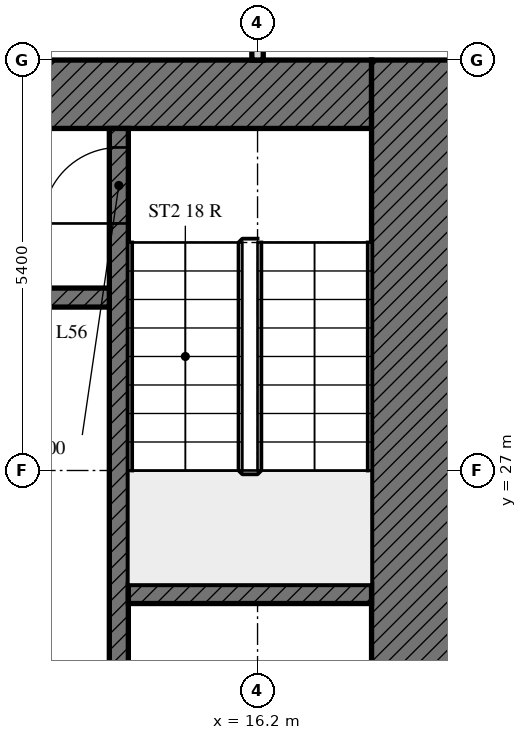
"""IFC4 building model, lengths in metres.
Left out: names, types, materials, properties, quantities, classifications, styles, units other than length and angle.
Written with IfcOpenShell. Run it as: python <this file> out.ifc"""

import sys

from ifc_helpers import new_model, si_unit, direction, frame, frame_2d, origin, place, context, subcontext, project, spatial, rectangle, extrude, element, fill, save


model = new_model("IFC4")
c1 = context("Model", 3, precision=1e-05, world=origin(), true_north=direction((0.0, 1.0)))
c2 = subcontext(c1, "Body", "Model", "MODEL_VIEW")
j1 = project(units=[si_unit("LENGTHUNIT", "METRE"), si_unit("PLANEANGLEUNIT", "RADIAN")], contexts=[c1])
p1 = place(None, origin())
s1 = spatial("IfcSite", under=j1, at=p1, CompositionType="ELEMENT")
p2 = place(p1, origin())
s2 = spatial("IfcBuilding", under=s1, at=p2, CompositionType="ELEMENT")
p3 = place(p2, frame((0.0, 0.0, 223.6)))
s3 = spatial("IfcBuildingStorey", under=s2, at=p3, CompositionType="ELEMENT", Elevation=223.6)
p4 = place(p3, frame((6.6, 31.95, 0.0), z_axis=(0.0, 0.0, 1.0), x_axis=(1.0, 0.0, 0.0)))
e1 = element("IfcWall", 1, at=p4, inside=s3, PredefinedType="SOLIDWALL", context=c2, shape_type="SweptSolid", body=[
    extrude(rectangle(XDim=11.1, YDim=0.9, at=frame_2d((5.55, 0.0))), origin(), (0.0, 0.0, 1.0), 3.0),
])
p5 = place(p4, frame((3.55, 0.0, 0.0)))
e2 = element("IfcOpeningElement", 2, at=p5, cuts=e1, PredefinedType="OPENING", context=c2, shape_type="SweptSolid", body=[
    extrude(rectangle(XDim=2.0, YDim=2.4, at=frame_2d((1.0, 1.2))), frame((0.0, 0.45, 0.0), z_axis=(0.0, -1.0, 0.0), x_axis=(1.0, 0.0, 0.0)), (0.0, 0.0, 1.0), 0.9),
])
p6 = place(p3, frame((18.3, 32.4, 0.0), z_axis=(0.0, 0.0, 1.0), x_axis=(0.0, -1.0, 0.0)))
e3 = element("IfcWall", 3, at=p6, inside=s3, PredefinedType="SOLIDWALL", context=c2, shape_type="SweptSolid", body=[
    extrude(rectangle(XDim=16.2, YDim=1.2, at=frame_2d((8.1, 0.0))), origin(), (0.0, 0.0, 1.0), 3.0),
])
p7 = place(p3, frame((14.375, 17.1, 0.0), z_axis=(0.0, 0.0, 1.0), x_axis=(0.0, 1.0, 0.0)))
e4 = element("IfcWall", 4, at=p7, inside=s3, PredefinedType="SOLIDWALL", context=c2, shape_type="SweptSolid", body=[
    extrude(rectangle(XDim=14.4, YDim=0.25, at=frame_2d((7.2, 0.0))), origin(), (0.0, 0.0, 1.0), 3.0),
])
p8 = place(p7, frame((13.15, 0.0, 0.0)))
e5 = element("IfcOpeningElement", 5, at=p8, cuts=e4, PredefinedType="OPENING", context=c2, shape_type="SweptSolid", body=[
    extrude(rectangle(XDim=1.0, YDim=2.1, at=frame_2d((0.5, 1.05))), frame((0.0, 0.125, 0.0), z_axis=(0.0, -1.0, 0.0), x_axis=(1.0, 0.0, 0.0)), (0.0, 0.0, 1.0), 0.25),
])
p9 = place(p7, frame((0.6, 0.0, 0.0)))
e6 = element("IfcOpeningElement", 6, at=p9, cuts=e4, PredefinedType="OPENING", context=c2, shape_type="SweptSolid", body=[
    extrude(rectangle(XDim=1.1, YDim=2.1, at=frame_2d((0.55, 1.05))), frame((0.0, 0.125, 0.0), z_axis=(0.0, -1.0, 0.0), x_axis=(1.0, 0.0, 0.0)), (0.0, 0.0, 1.0), 0.25),
])
p10 = place(p7, frame((3.25, 0.0, 0.0)))
e7 = element("IfcOpeningElement", 7, at=p10, cuts=e4, PredefinedType="OPENING", context=c2, shape_type="SweptSolid", body=[
    extrude(rectangle(XDim=0.9, YDim=2.1, at=frame_2d((0.45, 1.05))), frame((0.0, 0.125, 0.0), z_axis=(0.0, -1.0, 0.0), x_axis=(1.0, 0.0, 0.0)), (0.0, 0.0, 1.0), 0.25),
])
p11 = place(p3, frame((14.5, 25.375, 0.0), z_axis=(0.0, 0.0, 1.0), x_axis=(1.0, 0.0, 0.0)))
e8 = element("IfcWall", 8, at=p11, inside=s3, PredefinedType="SOLIDWALL", context=c2, shape_type="SweptSolid", body=[
    extrude(rectangle(XDim=3.2, YDim=0.25, at=frame_2d((1.6, 0.0))), origin(), (0.0, 0.0, 1.0), 3.0),
])
p12 = place(p3, frame((12.3, 29.275, 0.0), z_axis=(0.0, 0.0, 1.0), x_axis=(1.0, 0.0, 0.0)))
e9 = element("IfcWall", 9, at=p12, inside=s3, PredefinedType="SOLIDWALL", context=c2, shape_type="SweptSolid", body=[
    extrude(rectangle(XDim=1.95, YDim=0.25, at=frame_2d((0.975, 0.0))), origin(), (0.0, 0.0, 1.0), 3.0),
])
p13 = place(p3, frame((16.2, 37.405, 0.0), z_axis=(0.0, 0.0, 1.0), x_axis=(0.0, -1.0, 0.0)))
e10 = element("IfcWall", 10, at=p13, inside=s3, PredefinedType="PARTITIONING", context=c2, shape_type="SweptSolid", body=[
    extrude(rectangle(XDim=5.005, YDim=0.15, at=frame_2d((2.502, 0.0))), origin(), (0.0, 0.0, 1.0), 2.4),
])
p14 = place(p8, origin())
e11 = element("IfcDoor", 11, at=p14, inside=s3, OperationType="SINGLE_SWING_LEFT", PredefinedType="DOOR", context=c2, shape_type="SweptSolid", body=[
    extrude(rectangle(XDim=1.0, YDim=2.1, at=frame_2d((0.5, 1.05))), frame((0.0, 0.025, 0.0), z_axis=(0.0, -1.0, 0.0), x_axis=(1.0, 0.0, 0.0)), (0.0, 0.0, 1.0), 0.05),
])
fill(e5, e11)
save(model, sys.argv[1])
